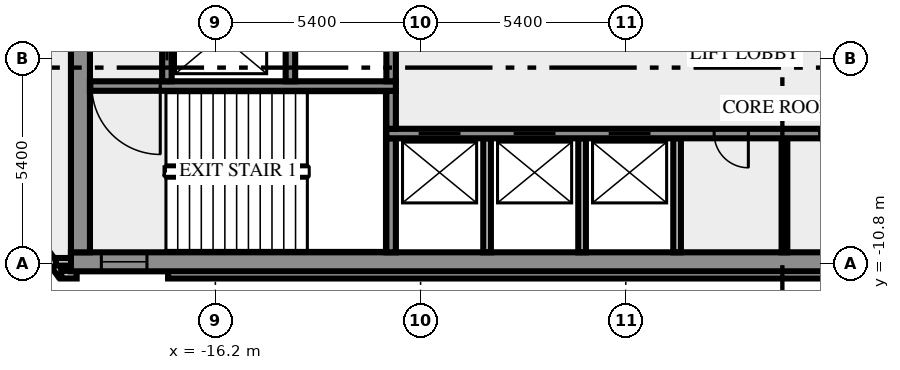
"""IFC4 building model, lengths in metres.
Left out: names, types, materials, properties, quantities, classifications, styles, units other than length and angle.
Written with IfcOpenShell. Run it as: python <this file> out.ifc"""

import sys

from ifc_helpers import new_model, si_unit, direction, frame, frame_2d, origin, place, context, subcontext, project, spatial, rectangle, extrude, element, fill, save


model = new_model("IFC4")
c1 = context("Model", 3, precision=1e-05, world=origin(), true_north=direction((0.0, 1.0)))
c2 = subcontext(c1, "Body", "Model", "MODEL_VIEW")
j1 = project(units=[si_unit("LENGTHUNIT", "METRE"), si_unit("PLANEANGLEUNIT", "RADIAN")], contexts=[c1])
p1 = place(None, origin())
s1 = spatial("IfcSite", under=j1, at=p1, CompositionType="ELEMENT")
p2 = place(p1, origin())
s2 = spatial("IfcBuilding", under=s1, at=p2, CompositionType="ELEMENT")
p3 = place(p2, frame((0.0, 0.0, 11.5)))
s3 = spatial("IfcBuildingStorey", under=s2, at=p3, CompositionType="ELEMENT", Elevation=11.5)
p4 = place(p3, frame((-21.833, -8.909, 0.0), z_axis=(0.0, 0.0, 1.0), x_axis=(0.587766567315, -0.809030569476, 0.0)))
e1 = element("IfcWall", 1, at=p4, inside=s3, PredefinedType="SOLIDWALL", context=c2, shape_type="SweptSolid", body=[
    extrude(rectangle(XDim=2.688, YDim=0.2, at=frame_2d((1.344, 0.0))), origin(), (0.0, 0.0, 1.0), 4.1),
])
p5 = place(p3, frame((-20.256, -11.088, 0.0), z_axis=(0.0, 0.0, 1.0), x_axis=(1.0, 0.0, 0.0)))
e2 = element("IfcWall", 2, at=p5, inside=s3, PredefinedType="SOLIDWALL", context=c2, shape_type="SweptSolid", body=[
    extrude(rectangle(XDim=0.406, YDim=0.2, at=frame_2d((0.203, 0.0))), origin(), (0.0, 0.0, 1.0), 4.1),
])
p6 = place(p3, frame((-17.444, -11.088, 0.0), z_axis=(0.0, 0.0, 1.0), x_axis=(1.0, 0.0, 0.0)))
e3 = element("IfcWall", 3, at=p6, inside=s3, PredefinedType="SOLIDWALL", context=c2, shape_type="SweptSolid", body=[
    extrude(rectangle(XDim=34.888, YDim=0.2, at=frame_2d((17.444, 0.0))), origin(), (0.0, 0.0, 1.0), 4.1),
])
p7 = place(p3, frame((-19.98, -10.75, 0.0), z_axis=(0.0, 0.0, 1.0), x_axis=(-1.0, 0.0, 0.0)))
e4 = element("IfcWall", 4, at=p7, inside=s3, PredefinedType="SOLIDWALL", context=c2, shape_type="SweptSolid", body=[
    extrude(rectangle(XDim=0.417, YDim=0.2, at=frame_2d((0.208, 0.0))), origin(), (0.0, 0.0, 1.0), 4.1),
])
p8 = place(p3, frame((-20.0, -10.75, 0.0), z_axis=(0.0, 0.0, 1.0), x_axis=(1.0, 0.0, 0.0)))
e5 = element("IfcWall", 5, at=p8, inside=s3, PredefinedType="SHEAR", context=c2, shape_type="SweptSolid", body=[
    extrude(rectangle(XDim=40.0, YDim=0.5, at=frame_2d((20.0, 0.0))), origin(), (0.0, 0.0, 1.0), 4.1),
])
p9 = place(p8, frame((0.8, 0.0, 1.0)))
e6 = element("IfcOpeningElement", 6, at=p9, cuts=e5, PredefinedType="OPENING", context=c2, shape_type="SweptSolid", body=[
    extrude(rectangle(XDim=1.2, YDim=1.2, at=frame_2d((0.6, 0.6))), frame((0.0, 0.26, 0.0), z_axis=(0.0, -1.0, 0.0), x_axis=(1.0, 0.0, 0.0)), (0.0, 0.0, 1.0), 0.52),
])
p10 = place(p8, frame((38.0, 0.0, 1.0)))
e7 = element("IfcOpeningElement", 7, at=p10, cuts=e5, PredefinedType="OPENING", context=c2, shape_type="SweptSolid", body=[
    extrude(rectangle(XDim=1.2, YDim=1.2, at=frame_2d((0.6, 0.6))), frame((0.0, 0.26, 0.0), z_axis=(0.0, -1.0, 0.0), x_axis=(1.0, 0.0, 0.0)), (0.0, 0.0, 1.0), 0.52),
])
p11 = place(p3, frame((-19.75, -10.5, 0.0), z_axis=(0.0, 0.0, 1.0), x_axis=(0.0, 1.0, 0.0)))
e8 = element("IfcWall", 8, at=p11, inside=s3, PredefinedType="SHEAR", context=c2, shape_type="SweptSolid", body=[
    extrude(rectangle(XDim=8.8, YDim=0.5, at=frame_2d((4.4, 0.0))), origin(), (0.0, 0.0, 1.0), 4.1),
])
p12 = place(p3, frame((-11.575, -10.5, 0.0), z_axis=(0.0, 0.0, 1.0), x_axis=(0.0, 1.0, 0.0)))
e9 = element("IfcWall", 9, at=p12, inside=s3, PredefinedType="SHEAR", context=c2, shape_type="SweptSolid", body=[
    extrude(rectangle(XDim=3.0, YDim=0.25, at=frame_2d((1.5, 0.0))), origin(), (0.0, 0.0, 1.0), 4.1),
])
for number, where, z_axis, x_axis in (
    (10, (-9.05, -10.5, 0.0), (0.0, 0.0, 1.0), (0.0, 1.0, 0.0)),
    (11, (-6.55, -10.5, 0.0), (0.0, 0.0, 1.0), (0.0, 1.0, 0.0)),
    (12, (-4.05, -10.5, 0.0), (0.0, 0.0, 1.0), (0.0, 1.0, 0.0)),
):
    element("IfcWall", number, at=place(p3, frame(where, z_axis=z_axis, x_axis=x_axis)), inside=s3, PredefinedType="SOLIDWALL", context=c2, shape_type="SweptSolid", body=[
        extrude(rectangle(XDim=3.0, YDim=0.2, at=frame_2d((1.5, 0.0))), origin(), (0.0, 0.0, 1.0), 4.1),
    ])
p13 = place(p3, frame((-1.225, -10.5, 0.0), z_axis=(0.0, 0.0, 1.0), x_axis=(0.0, 1.0, 0.0)))
e13 = element("IfcWall", 13, at=p13, inside=s3, PredefinedType="PARTITIONING", context=c2, shape_type="SweptSolid", body=[
    extrude(rectangle(XDim=3.0, YDim=0.15, at=frame_2d((1.5, 0.0))), origin(), (0.0, 0.0, 1.0), 4.1),
])
p14 = place(p3, frame((11.7, -7.375, 0.0), z_axis=(0.0, 0.0, 1.0), x_axis=(-1.0, 0.0, 0.0)))
e14 = element("IfcWall", 14, at=p14, inside=s3, PredefinedType="SHEAR", context=c2, shape_type="SweptSolid", body=[
    extrude(rectangle(XDim=23.4, YDim=0.25, at=frame_2d((11.7, 0.0))), origin(), (0.0, 0.0, 1.0), 4.1),
])
p15 = place(p14, frame((21.45, 0.0, 0.0)))
e15 = element("IfcOpeningElement", 15, at=p15, cuts=e14, PredefinedType="OPENING", context=c2, shape_type="SweptSolid", body=[
    extrude(rectangle(XDim=1.1, YDim=2.1, at=frame_2d((0.55, 1.05))), frame((0.0, 0.135, 0.0), z_axis=(0.0, -1.0, 0.0), x_axis=(1.0, 0.0, 0.0)), (0.0, 0.0, 1.0), 0.27),
])
p16 = place(p14, frame((18.95, 0.0, 0.0)))
e16 = element("IfcOpeningElement", 16, at=p16, cuts=e14, PredefinedType="OPENING", context=c2, shape_type="SweptSolid", body=[
    extrude(rectangle(XDim=1.1, YDim=2.1, at=frame_2d((0.55, 1.05))), frame((0.0, 0.135, 0.0), z_axis=(0.0, -1.0, 0.0), x_axis=(1.0, 0.0, 0.0)), (0.0, 0.0, 1.0), 0.27),
])
p17 = place(p14, frame((16.45, 0.0, 0.0)))
e17 = element("IfcOpeningElement", 17, at=p17, cuts=e14, PredefinedType="OPENING", context=c2, shape_type="SweptSolid", body=[
    extrude(rectangle(XDim=1.1, YDim=2.1, at=frame_2d((0.55, 1.05))), frame((0.0, 0.135, 0.0), z_axis=(0.0, -1.0, 0.0), x_axis=(1.0, 0.0, 0.0)), (0.0, 0.0, 1.0), 0.27),
])
p18 = place(p14, frame((13.875, 0.0, 0.0)))
e18 = element("IfcOpeningElement", 18, at=p18, cuts=e14, PredefinedType="OPENING", context=c2, shape_type="SweptSolid", body=[
    extrude(rectangle(XDim=0.9, YDim=2.1, at=frame_2d((0.45, 1.05))), frame((0.0, 0.135, 0.0), z_axis=(0.0, -1.0, 0.0), x_axis=(1.0, 0.0, 0.0)), (0.0, 0.0, 1.0), 0.27),
])
p19 = place(p14, frame((11.1, 0.0, 0.0)))
e19 = element("IfcOpeningElement", 19, at=p19, cuts=e14, PredefinedType="OPENING", context=c2, shape_type="SweptSolid", body=[
    extrude(rectangle(XDim=0.9, YDim=2.1, at=frame_2d((0.45, 1.05))), frame((0.0, 0.135, 0.0), z_axis=(0.0, -1.0, 0.0), x_axis=(1.0, 0.0, 0.0)), (0.0, 0.0, 1.0), 0.27),
])
p20 = place(p3, frame((-11.575, -7.25, 0.0), z_axis=(0.0, 0.0, 1.0), x_axis=(0.0, 1.0, 0.0)))
e20 = element("IfcWall", 20, at=p20, inside=s3, PredefinedType="SHEAR", context=c2, shape_type="SweptSolid", body=[
    extrude(rectangle(XDim=1.0, YDim=0.25, at=frame_2d((0.5, 0.0))), origin(), (0.0, 0.0, 1.0), 4.1),
])
p21 = place(p3, frame((-11.45, -6.125, 0.0), z_axis=(0.0, 0.0, 1.0), x_axis=(-1.0, 0.0, 0.0)))
e21 = element("IfcWall", 21, at=p21, inside=s3, PredefinedType="SHEAR", context=c2, shape_type="SweptSolid", body=[
    extrude(rectangle(XDim=8.05, YDim=0.25, at=frame_2d((4.025, 0.0))), origin(), (0.0, 0.0, 1.0), 4.1),
])
p22 = place(p21, frame((6.2, 0.0, 0.0)))
e22 = element("IfcOpeningElement", 22, at=p22, cuts=e21, PredefinedType="OPENING", context=c2, shape_type="SweptSolid", body=[
    extrude(rectangle(XDim=1.8, YDim=2.1, at=frame_2d((0.9, 1.05))), frame((0.0, 0.135, 0.0), z_axis=(0.0, -1.0, 0.0), x_axis=(1.0, 0.0, 0.0)), (0.0, 0.0, 1.0), 0.27),
])
p23 = place(p3, frame((-17.475, -6.0, 0.0), z_axis=(0.0, 0.0, 1.0), x_axis=(0.0, 1.0, 0.0)))
e23 = element("IfcWall", 23, at=p23, inside=s3, PredefinedType="SHEAR", context=c2, shape_type="SweptSolid", body=[
    extrude(rectangle(XDim=4.3, YDim=0.25, at=frame_2d((2.15, 0.0))), origin(), (0.0, 0.0, 1.0), 4.1),
])
p24 = place(p23, frame((0.55, 0.0, 0.0)))
e24 = element("IfcOpeningElement", 24, at=p24, cuts=e23, PredefinedType="OPENING", context=c2, shape_type="SweptSolid", body=[
    extrude(rectangle(XDim=1.3, YDim=2.1, at=frame_2d((0.65, 1.05))), frame((0.0, 0.135, 0.0), z_axis=(0.0, -1.0, 0.0), x_axis=(1.0, 0.0, 0.0)), (0.0, 0.0, 1.0), 0.27),
])
p25 = place(p3, frame((-14.225, -6.0, 0.0), z_axis=(0.0, 0.0, 1.0), x_axis=(0.0, 1.0, 0.0)))
e25 = element("IfcWall", 25, at=p25, inside=s3, PredefinedType="SHEAR", context=c2, shape_type="SweptSolid", body=[
    extrude(rectangle(XDim=4.3, YDim=0.25, at=frame_2d((2.15, 0.0))), origin(), (0.0, 0.0, 1.0), 4.1),
])
p26 = place(p3, frame((-11.575, -6.0, 0.0), z_axis=(0.0, 0.0, 1.0), x_axis=(0.0, 1.0, 0.0)))
e26 = element("IfcWall", 26, at=p26, inside=s3, PredefinedType="SHEAR", context=c2, shape_type="SweptSolid", body=[
    extrude(rectangle(XDim=1.75, YDim=0.25, at=frame_2d((0.875, 0.0))), origin(), (0.0, 0.0, 1.0), 4.1),
])
p27 = place(p9, origin())
e27 = element("IfcWindow", 27, at=p27, inside=s3, PartitioningType="SINGLE_PANEL", PredefinedType="WINDOW", context=c2, shape_type="SweptSolid", body=[
    extrude(rectangle(XDim=1.2, YDim=1.2, at=frame_2d((0.6, 0.6))), frame((0.0, 0.03, 0.0), z_axis=(0.0, -1.0, 0.0), x_axis=(1.0, 0.0, 0.0)), (0.0, 0.0, 1.0), 0.06),
])
fill(e6, e27)
p28 = place(p15, origin())
e28 = element("IfcDoor", 28, at=p28, inside=s3, OperationType="DOUBLE_DOOR_SLIDING", PredefinedType="DOOR", context=c2, shape_type="SweptSolid", body=[
    extrude(rectangle(XDim=1.1, YDim=2.1, at=frame_2d((0.55, 1.05))), frame((0.0, 0.025, 0.0), z_axis=(0.0, -1.0, 0.0), x_axis=(1.0, 0.0, 0.0)), (0.0, 0.0, 1.0), 0.05),
])
fill(e15, e28)
p29 = place(p16, origin())
e29 = element("IfcDoor", 29, at=p29, inside=s3, OperationType="DOUBLE_DOOR_SLIDING", PredefinedType="DOOR", context=c2, shape_type="SweptSolid", body=[
    extrude(rectangle(XDim=1.1, YDim=2.1, at=frame_2d((0.55, 1.05))), frame((0.0, 0.025, 0.0), z_axis=(0.0, -1.0, 0.0), x_axis=(1.0, 0.0, 0.0)), (0.0, 0.0, 1.0), 0.05),
])
fill(e16, e29)
p30 = place(p17, origin())
e30 = element("IfcDoor", 30, at=p30, inside=s3, OperationType="DOUBLE_DOOR_SLIDING", PredefinedType="DOOR", context=c2, shape_type="SweptSolid", body=[
    extrude(rectangle(XDim=1.1, YDim=2.1, at=frame_2d((0.55, 1.05))), frame((0.0, 0.025, 0.0), z_axis=(0.0, -1.0, 0.0), x_axis=(1.0, 0.0, 0.0)), (0.0, 0.0, 1.0), 0.05),
])
fill(e17, e30)
p31 = place(p18, origin())
e31 = element("IfcDoor", 31, at=p31, inside=s3, OperationType="SINGLE_SWING_RIGHT", PredefinedType="DOOR", context=c2, shape_type="SweptSolid", body=[
    extrude(rectangle(XDim=0.9, YDim=2.1, at=frame_2d((0.45, 1.05))), frame((0.0, 0.025, 0.0), z_axis=(0.0, -1.0, 0.0), x_axis=(1.0, 0.0, 0.0)), (0.0, 0.0, 1.0), 0.05),
])
fill(e18, e31)
p32 = place(p22, origin())
e32 = element("IfcDoor", 32, at=p32, inside=s3, OperationType="DOUBLE_DOOR_SINGLE_SWING", PredefinedType="DOOR", context=c2, shape_type="SweptSolid", body=[
    extrude(rectangle(XDim=1.8, YDim=2.1, at=frame_2d((0.9, 1.05))), frame((0.0, 0.025, 0.0), z_axis=(0.0, -1.0, 0.0), x_axis=(1.0, 0.0, 0.0)), (0.0, 0.0, 1.0), 0.05),
])
fill(e22, e32)
p33 = place(p24, origin())
e33 = element("IfcDoor", 33, at=p33, inside=s3, OperationType="DOUBLE_DOOR_SLIDING", PredefinedType="DOOR", context=c2, shape_type="SweptSolid", body=[
    extrude(rectangle(XDim=1.3, YDim=2.1, at=frame_2d((0.65, 1.05))), frame((0.0, 0.025, 0.0), z_axis=(0.0, -1.0, 0.0), x_axis=(1.0, 0.0, 0.0)), (0.0, 0.0, 1.0), 0.05),
])
fill(e24, e33)
save(model, sys.argv[1])
